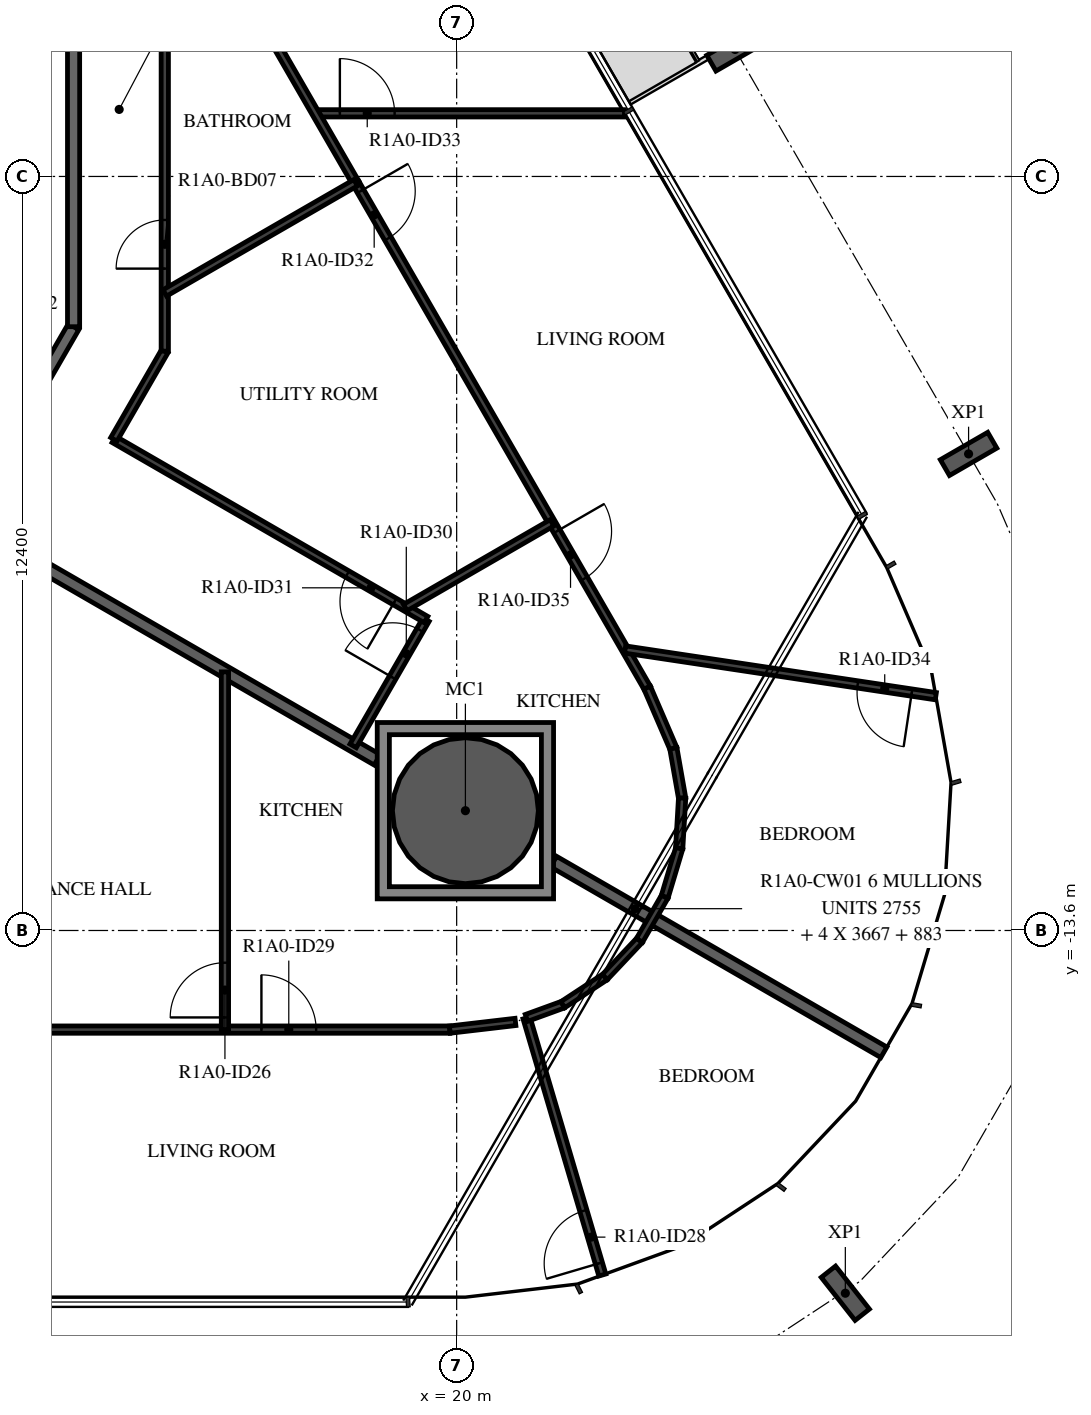
"""IFC4 building model, lengths in metres.
Left out: names, types, materials, properties, quantities, classifications, styles, units other than length and angle.
Written with IfcOpenShell. Run it as: python <this file> out.ifc"""

import sys

from ifc_helpers import new_model, si_unit, direction, frame, frame_2d, origin, origin_2d, place, context, subcontext, project, spatial, polyline, rectangle, hollow_circle, i_section, outline, extrude, element, fill, save


model = new_model("IFC4")
c1 = context("Model", 3, precision=1e-05, world=origin(), true_north=direction((0.0, 1.0)))
c2 = subcontext(c1, "Body", "Model", "MODEL_VIEW")
j1 = project(units=[si_unit("LENGTHUNIT", "METRE"), si_unit("PLANEANGLEUNIT", "RADIAN")], contexts=[c1])
p1 = place(None, origin())
s1 = spatial("IfcSite", under=j1, at=p1, CompositionType="ELEMENT")
p2 = place(p1, origin())
s2 = spatial("IfcBuilding", under=s1, at=p2, CompositionType="ELEMENT")
p3 = place(p2, frame((0.0, 0.0, 45.4)))
s3 = spatial("IfcBuildingStorey", under=s2, at=p3, CompositionType="ELEMENT", Elevation=45.4)
p4 = place(p3, frame((20.144, -11.63, -0.38), z_axis=(0.0, 0.0, 1.0), x_axis=(1.0, 0.0, 0.0)))
e1 = element("IfcColumn", 1, at=p4, inside=s3, PredefinedType="COLUMN", context=c2, shape_type="SweptSolid", body=[
    extrude(hollow_circle(Radius=1.2, WallThickness=0.06, at=origin_2d()), origin(), (0.0, 0.0, 1.0), 3.5),
])
for number, where, z_axis, x_axis in (
    (2, (26.392, -19.565, -0.38), (0.0, 0.0, 1.0), (-0.786, -0.619, 0.0)),
    (3, (28.419, -5.763, -0.38), (0.0, 0.0, 1.0), (0.5, -0.866, 0.0)),
    (4, (24.579, 0.888, -0.38), (0.0, 0.0, 1.0), (0.5, -0.866, 0.0)),
):
    element("IfcColumn", number, at=place(p3, frame(where, z_axis=z_axis, x_axis=x_axis)), inside=s3, PredefinedType="COLUMN", context=c2, shape_type="SweptSolid", body=[
        extrude(i_section(OverallWidth=0.3, OverallDepth=0.9, WebThickness=0.019, FlangeThickness=0.035, FilletRadius=0.03, at=origin_2d()), origin(), (0.0, 0.0, 1.0), 3.5),
    ])
p5 = place(p3, frame((11.865, -6.849, 0.0), z_axis=(0.0, 0.0, 1.0), x_axis=(0.500002704028, 0.866023842607, 0.0)))
e5 = element("IfcWall", 5, at=p5, inside=s3, PredefinedType="STANDARD", context=c2, shape_type="SweptSolid", body=[
    extrude(rectangle(XDim=3.67, YDim=0.2, at=frame_2d((1.835, 0.0))), origin(), (0.0, 0.0, 1.0), 3.12),
])
p6 = place(p3, frame((13.7, -3.671, 0.0), z_axis=(0.0, 0.0, 1.0), x_axis=(0.0, 1.0, 0.0)))
e6 = element("IfcWall", 6, at=p6, inside=s3, PredefinedType="STANDARD", context=c2, shape_type="SweptSolid", body=[
    extrude(rectangle(XDim=7.146, YDim=0.2, at=frame_2d((3.573, 0.0))), origin(), (0.0, 0.0, 1.0), 3.12),
])
p7 = place(p6, frame((5.947, 0.0, 0.0)))
e7 = element("IfcOpeningElement", 7, at=p7, cuts=e6, PredefinedType="OPENING", context=c2, shape_type="SweptSolid", body=[
    extrude(rectangle(XDim=1.0, YDim=2.1, at=frame_2d((0.5, 1.05))), frame((0.0, 0.11, 0.0), z_axis=(0.0, -1.0, 0.0), x_axis=(1.0, 0.0, 0.0)), (0.0, 0.0, 1.0), 0.22),
])
p8 = place(p3, frame((18.694, -10.793, 0.0), z_axis=(0.0, 0.0, 1.0), x_axis=(-0.865964895271, 0.500104789178, 0.0)))
e8 = element("IfcWall", 8, at=p8, inside=s3, PredefinedType="STANDARD", context=c2, shape_type="SweptSolid", body=[
    extrude(rectangle(XDim=7.885, YDim=0.2, at=frame_2d((3.943, 0.0))), origin(), (0.0, 0.0, 1.0), 3.12),
])
p9 = place(p3, frame((27.025, -15.603, 0.0), z_axis=(0.0, 0.0, 1.0), x_axis=(-0.866030653443, 0.499990907215, 0.0)))
e9 = element("IfcWall", 9, at=p9, inside=s3, PredefinedType="STANDARD", context=c2, shape_type="SweptSolid", body=[
    extrude(rectangle(XDim=6.271, YDim=0.2, at=frame_2d((3.136, 0.0))), origin(), (0.0, 0.0, 1.0), 3.12),
])
p10 = place(p3, frame((9.124, -15.23, 0.0), z_axis=(0.0, 0.0, 1.0), x_axis=(1.0, 0.0, 0.0)))
e10 = element("IfcWall", 10, at=p10, inside=s3, PredefinedType="PARTITIONING", context=c2, shape_type="SweptSolid", body=[
    extrude(rectangle(XDim=10.764, YDim=0.12, at=frame_2d((5.382, 0.0))), origin(), (0.0, 0.0, 1.0), 3.12),
])
p11 = place(p10, frame((0.3, 0.0, 0.0)))
e11 = element("IfcOpeningElement", 11, at=p11, cuts=e10, PredefinedType="OPENING", context=c2, shape_type="SweptSolid", body=[
    extrude(rectangle(XDim=0.9, YDim=2.1, at=frame_2d((0.45, 1.05))), frame((0.0, 0.07, 0.0), z_axis=(0.0, -1.0, 0.0), x_axis=(1.0, 0.0, 0.0)), (0.0, 0.0, 1.0), 0.14),
])
p12 = place(p10, frame((7.665, 0.0, 0.0)))
e12 = element("IfcOpeningElement", 12, at=p12, cuts=e10, PredefinedType="OPENING", context=c2, shape_type="SweptSolid", body=[
    extrude(rectangle(XDim=0.9, YDim=2.1, at=frame_2d((0.45, 1.05))), frame((0.0, 0.07, 0.0), z_axis=(0.0, -1.0, 0.0), x_axis=(1.0, 0.0, 0.0)), (0.0, 0.0, 1.0), 0.14),
])
p13 = place(p3, frame((16.189, -15.23, 0.0), z_axis=(0.0, 0.0, 1.0), x_axis=(0.0, 1.0, 0.0)))
e13 = element("IfcWall", 13, at=p13, inside=s3, PredefinedType="PARTITIONING", context=c2, shape_type="SweptSolid", body=[
    extrude(rectangle(XDim=5.883, YDim=0.12, at=frame_2d((2.942, 0.0))), origin(), (0.0, 0.0, 1.0), 3.12),
])
p14 = place(p13, frame((0.2, 0.0, 0.0)))
e14 = element("IfcOpeningElement", 14, at=p14, cuts=e13, PredefinedType="OPENING", context=c2, shape_type="SweptSolid", body=[
    extrude(rectangle(XDim=0.9, YDim=2.1, at=frame_2d((0.45, 1.05))), frame((0.0, 0.07, 0.0), z_axis=(0.0, -1.0, 0.0), x_axis=(1.0, 0.0, 0.0)), (0.0, 0.0, 1.0), 0.14),
])
p15 = place(p3, frame((20.967, -15.104, 0.0), z_axis=(0.0, 0.0, 1.0), x_axis=(-0.993231641151, -0.116150363826, 0.0)))
e15 = element("IfcWall", 15, at=p15, inside=s3, PredefinedType="PARTITIONING", context=c2, shape_type="SweptSolid", body=[
    extrude(rectangle(XDim=1.087, YDim=0.12, at=frame_2d((0.543, 0.0))), origin(), (0.0, 0.0, 1.0), 3.12),
])
p16 = place(p3, frame((22.396, -19.266, 0.0), z_axis=(0.0, 0.0, 1.0), x_axis=(-0.282873823334, 0.959157130022, 0.0)))
e16 = element("IfcWall", 16, at=p16, inside=s3, PredefinedType="PARTITIONING", context=c2, shape_type="SweptSolid", body=[
    extrude(rectangle(XDim=4.409, YDim=0.12, at=frame_2d((2.204, 0.0))), origin(), (0.0, 0.0, 1.0), 3.12),
])
p17 = place(p16, frame((0.2, 0.0, 0.0)))
e17 = element("IfcOpeningElement", 17, at=p17, cuts=e16, PredefinedType="OPENING", context=c2, shape_type="SweptSolid", body=[
    extrude(rectangle(XDim=0.9, YDim=2.1, at=frame_2d((0.45, 1.05))), frame((0.0, 0.07, 0.0), z_axis=(0.0, -1.0, 0.0), x_axis=(1.0, 0.0, 0.0)), (0.0, 0.0, 1.0), 0.14),
])
p18 = place(p3, frame((21.149, -15.038, 0.0), z_axis=(0.0, 0.0, 1.0), x_axis=(0.939726102094, 0.341928140173, 0.0)))
e18 = element("IfcWall", 18, at=p18, inside=s3, PredefinedType="PARTITIONING", context=c2, shape_type="SweptSolid", body=[
    extrude(rectangle(XDim=0.635, YDim=0.12, at=frame_2d((0.318, 0.0))), origin(), (0.0, 0.0, 1.0), 3.12),
])
p19 = place(p3, frame((21.746, -14.82, 0.0), z_axis=(0.0, 0.0, 1.0), x_axis=(0.835477570013, 0.549524549046, 0.0)))
e19 = element("IfcWall", 19, at=p19, inside=s3, PredefinedType="PARTITIONING", context=c2, shape_type="SweptSolid", body=[
    extrude(rectangle(XDim=0.829, YDim=0.12, at=frame_2d((0.415, 0.0))), origin(), (0.0, 0.0, 1.0), 3.12),
])
p20 = place(p3, frame((22.438, -14.365, 0.0), z_axis=(0.0, 0.0, 1.0), x_axis=(0.686182189596, 0.727429723535, 0.0)))
e20 = element("IfcWall", 20, at=p20, inside=s3, PredefinedType="PARTITIONING", context=c2, shape_type="SweptSolid", body=[
    extrude(rectangle(XDim=0.829, YDim=0.12, at=frame_2d((0.414, 0.0))), origin(), (0.0, 0.0, 1.0), 3.12),
])
p21 = place(p3, frame((23.007, -13.762, 0.0), z_axis=(0.0, 0.0, 1.0), x_axis=(0.500002839747, 0.86602376425, 0.0)))
e21 = element("IfcWall", 21, at=p21, inside=s3, PredefinedType="PARTITIONING", context=c2, shape_type="SweptSolid", body=[
    extrude(rectangle(XDim=0.829, YDim=0.12, at=frame_2d((0.415, 0.0))), origin(), (0.0, 0.0, 1.0), 3.12),
])
p22 = place(p3, frame((18.298, -10.564, 0.0), z_axis=(0.0, 0.0, 1.0), x_axis=(0.499960392047, 0.866048270239, 0.0)))
e22 = element("IfcWall", 22, at=p22, inside=s3, PredefinedType="PARTITIONING", context=c2, shape_type="SweptSolid", body=[
    extrude(rectangle(XDim=2.398, YDim=0.12, at=frame_2d((1.199, 0.0))), origin(), (0.0, 0.0, 1.0), 3.12),
])
p23 = place(p22, frame((1.298, 0.0, 0.0)))
e23 = element("IfcOpeningElement", 23, at=p23, cuts=e22, PredefinedType="OPENING", context=c2, shape_type="SweptSolid", body=[
    extrude(rectangle(XDim=0.9, YDim=2.1, at=frame_2d((0.45, 1.05))), frame((0.0, 0.07, 0.0), z_axis=(0.0, -1.0, 0.0), x_axis=(1.0, 0.0, 0.0)), (0.0, 0.0, 1.0), 0.14),
])
p24 = place(p3, frame((19.497, -8.487, 0.0), z_axis=(0.0, 0.0, 1.0), x_axis=(-0.866027165828, 0.499996948039, 0.0)))
e24 = element("IfcWall", 24, at=p24, inside=s3, PredefinedType="PARTITIONING", context=c2, shape_type="SweptSolid", body=[
    extrude(rectangle(XDim=5.928, YDim=0.12, at=frame_2d((2.964, 0.0))), origin(), (0.0, 0.0, 1.0), 3.12),
])
p25 = place(p24, frame((0.595, 0.0, 0.0)))
e25 = element("IfcOpeningElement", 25, at=p25, cuts=e24, PredefinedType="OPENING", context=c2, shape_type="SweptSolid", body=[
    extrude(rectangle(XDim=0.9, YDim=2.1, at=frame_2d((0.45, 1.05))), frame((0.0, 0.07, 0.0), z_axis=(0.0, -1.0, 0.0), x_axis=(1.0, 0.0, 0.0)), (0.0, 0.0, 1.0), 0.14),
])
p26 = place(p3, frame((14.363, -5.523, 0.0), z_axis=(0.0, 0.0, 1.0), x_axis=(0.499995851058, 0.866027799164, 0.0)))
e26 = element("IfcWall", 26, at=p26, inside=s3, PredefinedType="PARTITIONING", context=c2, shape_type="SweptSolid", body=[
    extrude(rectangle(XDim=1.675, YDim=0.12, at=frame_2d((0.837, 0.0))), origin(), (0.0, 0.0, 1.0), 3.12),
])
p27 = place(p3, frame((15.2, -4.073, 0.0), z_axis=(0.0, 0.0, 1.0), x_axis=(0.0, 1.0, 0.0)))
e27 = element("IfcWall", 27, at=p27, inside=s3, PredefinedType="PARTITIONING", context=c2, shape_type="SweptSolid", body=[
    extrude(rectangle(XDim=8.146, YDim=0.12, at=frame_2d((4.073, 0.0))), origin(), (0.0, 0.0, 1.0), 3.12),
])
p28 = place(p27, frame((1.357, 0.0, 0.0)))
e28 = element("IfcOpeningElement", 28, at=p28, cuts=e27, PredefinedType="OPENING", context=c2, shape_type="SweptSolid", body=[
    extrude(rectangle(XDim=0.8, YDim=2.1, at=frame_2d((0.4, 1.05))), frame((0.0, 0.07, 0.0), z_axis=(0.0, -1.0, 0.0), x_axis=(1.0, 0.0, 0.0)), (0.0, 0.0, 1.0), 0.14),
])
p29 = place(p3, frame((17.679, -0.162, 0.0), z_axis=(0.0, 0.0, 1.0), x_axis=(1.0, 0.0, 0.0)))
e29 = element("IfcWall", 29, at=p29, inside=s3, PredefinedType="PARTITIONING", context=c2, shape_type="SweptSolid", body=[
    extrude(rectangle(XDim=5.081, YDim=0.12, at=frame_2d((2.54, 0.0))), origin(), (0.0, 0.0, 1.0), 3.12),
])
p30 = place(p29, frame((0.4, 0.0, 0.0)))
e30 = element("IfcOpeningElement", 30, at=p30, cuts=e29, PredefinedType="OPENING", context=c2, shape_type="SweptSolid", body=[
    extrude(rectangle(XDim=0.9, YDim=2.1, at=frame_2d((0.45, 1.05))), frame((0.0, 0.07, 0.0), z_axis=(0.0, -1.0, 0.0), x_axis=(1.0, 0.0, 0.0)), (0.0, 0.0, 1.0), 0.14),
])
p31 = place(p3, frame((15.11, 4.289, 0.0), z_axis=(0.0, 0.0, 1.0), x_axis=(0.500001702147, -0.866024421047, 0.0)))
e31 = element("IfcWall", 31, at=p31, inside=s3, PredefinedType="PARTITIONING", context=c2, shape_type="SweptSolid", body=[
    extrude(rectangle(XDim=6.458, YDim=0.12, at=frame_2d((3.229, 0.0))), origin(), (0.0, 0.0, 1.0), 3.12),
])
p32 = place(p3, frame((18.339, -1.303, 0.0), z_axis=(0.0, 0.0, 1.0), x_axis=(0.499989127021, -0.866031681211, 0.0)))
e32 = element("IfcWall", 32, at=p32, inside=s3, PredefinedType="PARTITIONING", context=c2, shape_type="SweptSolid", body=[
    extrude(rectangle(XDim=9.589, YDim=0.12, at=frame_2d((4.794, 0.0))), origin(), (0.0, 0.0, 1.0), 3.12),
])
p33 = place(p32, frame((0.16, 0.0, 0.0)))
e33 = element("IfcOpeningElement", 33, at=p33, cuts=e32, PredefinedType="OPENING", context=c2, shape_type="SweptSolid", body=[
    extrude(rectangle(XDim=0.9, YDim=2.1, at=frame_2d((0.45, 1.05))), frame((0.0, 0.07, 0.0), z_axis=(0.0, -1.0, 0.0), x_axis=(1.0, 0.0, 0.0)), (0.0, 0.0, 1.0), 0.14),
])
p34 = place(p32, frame((6.618, 0.0, 0.0)))
e34 = element("IfcOpeningElement", 34, at=p34, cuts=e32, PredefinedType="OPENING", context=c2, shape_type="SweptSolid", body=[
    extrude(rectangle(XDim=0.9, YDim=2.1, at=frame_2d((0.45, 1.05))), frame((0.0, 0.07, 0.0), z_axis=(0.0, -1.0, 0.0), x_axis=(1.0, 0.0, 0.0)), (0.0, 0.0, 1.0), 0.14),
])
p35 = place(p3, frame((23.133, -9.608, 0.0), z_axis=(0.0, 0.0, 1.0), x_axis=(0.396195073027, -0.918166359713, 0.0)))
e35 = element("IfcWall", 35, at=p35, inside=s3, PredefinedType="PARTITIONING", context=c2, shape_type="SweptSolid", body=[
    extrude(rectangle(XDim=1.087, YDim=0.12, at=frame_2d((0.543, 0.0))), origin(), (0.0, 0.0, 1.0), 3.12),
])
for number, where, z_axis, x_axis in (
    (36, (23.564, -10.606, 0.0), (0.0, 0.0, 1.0), (0.173, -0.985, 0.0)),
    (37, (23.708, -11.422, 0.0), (0.0, 0.0, 1.0), (-0.058, -0.998, 0.0)),
):
    element("IfcWall", number, at=place(p3, frame(where, z_axis=z_axis, x_axis=x_axis)), inside=s3, PredefinedType="PARTITIONING", context=c2, shape_type="SweptSolid", body=[
        extrude(rectangle(XDim=0.829, YDim=0.12, at=frame_2d((0.415, 0.0))), origin(), (0.0, 0.0, 1.0), 3.12),
    ])
p36 = place(p3, frame((23.659, -12.25, 0.0), z_axis=(0.0, 0.0, 1.0), x_axis=(-0.286834510868, -0.957980147694, 0.0)))
e38 = element("IfcWall", 38, at=p36, inside=s3, PredefinedType="PARTITIONING", context=c2, shape_type="SweptSolid", body=[
    extrude(rectangle(XDim=0.829, YDim=0.12, at=frame_2d((0.415, 0.0))), origin(), (0.0, 0.0, 1.0), 3.12),
])
p37 = place(p3, frame((27.88, -9.747, 0.0), z_axis=(0.0, 0.0, 1.0), x_axis=(-0.988899241625, 0.14858765061, 0.0)))
e39 = element("IfcWall", 39, at=p37, inside=s3, PredefinedType="PARTITIONING", context=c2, shape_type="SweptSolid", body=[
    extrude(rectangle(XDim=5.167, YDim=0.12, at=frame_2d((2.584, 0.0))), origin(), (0.0, 0.0, 1.0), 3.12),
])
p38 = place(p37, frame((0.4, 0.0, 0.0)))
e40 = element("IfcOpeningElement", 40, at=p38, cuts=e39, PredefinedType="OPENING", context=c2, shape_type="SweptSolid", body=[
    extrude(rectangle(XDim=0.9, YDim=2.1, at=frame_2d((0.45, 1.05))), frame((0.0, 0.07, 0.0), z_axis=(0.0, -1.0, 0.0), x_axis=(1.0, 0.0, 0.0)), (0.0, 0.0, 1.0), 0.14),
])
p39 = place(p3, frame((21.568, -6.896, 0.0), z_axis=(0.0, 0.0, 1.0), x_axis=(-0.866029478545, -0.499992942241, 0.0)))
e41 = element("IfcWall", 41, at=p39, inside=s3, PredefinedType="PARTITIONING", context=c2, shape_type="SweptSolid", body=[
    extrude(rectangle(XDim=2.787, YDim=0.12, at=frame_2d((1.393, 0.0))), origin(), (0.0, 0.0, 1.0), 3.12),
])
p40 = place(p3, frame((18.339, -1.303, 0.0), z_axis=(0.0, 0.0, 1.0), x_axis=(-0.866037510713, -0.499979029598, 0.0)))
e42 = element("IfcWall", 42, at=p40, inside=s3, PredefinedType="PARTITIONING", context=c2, shape_type="SweptSolid", body=[
    extrude(rectangle(XDim=3.624, YDim=0.12, at=frame_2d((1.812, 0.0))), origin(), (0.0, 0.0, 1.0), 3.12),
])
p41 = place(p3, origin())
e43 = element("IfcWall", 43, at=p41, inside=s3, PredefinedType="STANDARD", context=c2, shape_type="SweptSolid", body=[
    extrude(outline(polyline([(21.594, -10.18), (21.594, -13.08), (18.694, -13.08), (18.694, -10.18), (21.594, -10.18)]), holes=[polyline([(18.894, -12.88), (21.394, -12.88), (21.394, -10.38), (18.894, -10.38), (18.894, -12.88)])]), origin(), (0.0, 0.0, 1.0), 3.12),
])
p42 = place(p14, origin())
e44 = element("IfcDoor", 44, at=p42, inside=s3, OperationType="SINGLE_SWING_RIGHT", PredefinedType="DOOR", context=c2, shape_type="SweptSolid", body=[
    extrude(rectangle(XDim=0.9, YDim=2.1, at=frame_2d((0.45, 1.05))), frame((0.0, 0.025, 0.0), z_axis=(0.0, -1.0, 0.0), x_axis=(1.0, 0.0, 0.0)), (0.0, 0.0, 1.0), 0.05),
])
fill(e14, e44)
p43 = place(p17, origin())
e45 = element("IfcDoor", 45, at=p43, inside=s3, OperationType="SINGLE_SWING_RIGHT", PredefinedType="DOOR", context=c2, shape_type="SweptSolid", body=[
    extrude(rectangle(XDim=0.9, YDim=2.1, at=frame_2d((0.45, 1.05))), frame((0.0, 0.025, 0.0), z_axis=(0.0, -1.0, 0.0), x_axis=(1.0, 0.0, 0.0)), (0.0, 0.0, 1.0), 0.05),
])
fill(e17, e45)
p44 = place(p12, origin())
e46 = element("IfcDoor", 46, at=p44, inside=s3, OperationType="SINGLE_SWING_LEFT", PredefinedType="DOOR", context=c2, shape_type="SweptSolid", body=[
    extrude(rectangle(XDim=0.9, YDim=2.1, at=frame_2d((0.45, 1.05))), frame((0.0, 0.025, 0.0), z_axis=(0.0, -1.0, 0.0), x_axis=(1.0, 0.0, 0.0)), (0.0, 0.0, 1.0), 0.05),
])
fill(e12, e46)
p45 = place(p23, origin())
e47 = element("IfcDoor", 47, at=p45, inside=s3, OperationType="SINGLE_SWING_LEFT", PredefinedType="DOOR", context=c2, shape_type="SweptSolid", body=[
    extrude(rectangle(XDim=0.9, YDim=2.1, at=frame_2d((0.45, 1.05))), frame((0.0, 0.025, 0.0), z_axis=(0.0, -1.0, 0.0), x_axis=(1.0, 0.0, 0.0)), (0.0, 0.0, 1.0), 0.05),
])
fill(e23, e47)
p46 = place(p25, origin())
e48 = element("IfcDoor", 48, at=p46, inside=s3, OperationType="SINGLE_SWING_LEFT", PredefinedType="DOOR", context=c2, shape_type="SweptSolid", body=[
    extrude(rectangle(XDim=0.9, YDim=2.1, at=frame_2d((0.45, 1.05))), frame((0.0, 0.025, 0.0), z_axis=(0.0, -1.0, 0.0), x_axis=(1.0, 0.0, 0.0)), (0.0, 0.0, 1.0), 0.05),
])
fill(e25, e48)
p47 = place(p28, origin())
e49 = element("IfcDoor", 49, at=p47, inside=s3, OperationType="SINGLE_SWING_LEFT", PredefinedType="DOOR", context=c2, shape_type="SweptSolid", body=[
    extrude(rectangle(XDim=0.8, YDim=2.1, at=frame_2d((0.4, 1.05))), frame((0.0, 0.025, 0.0), z_axis=(0.0, -1.0, 0.0), x_axis=(1.0, 0.0, 0.0)), (0.0, 0.0, 1.0), 0.05),
])
fill(e28, e49)
p48 = place(p33, origin())
e50 = element("IfcDoor", 50, at=p48, inside=s3, OperationType="SINGLE_SWING_LEFT", PredefinedType="DOOR", context=c2, shape_type="SweptSolid", body=[
    extrude(rectangle(XDim=0.9, YDim=2.1, at=frame_2d((0.45, 1.05))), frame((0.0, 0.025, 0.0), z_axis=(0.0, -1.0, 0.0), x_axis=(1.0, 0.0, 0.0)), (0.0, 0.0, 1.0), 0.05),
])
fill(e33, e50)
p49 = place(p30, origin())
e51 = element("IfcDoor", 51, at=p49, inside=s3, OperationType="SINGLE_SWING_LEFT", PredefinedType="DOOR", context=c2, shape_type="SweptSolid", body=[
    extrude(rectangle(XDim=0.9, YDim=2.1, at=frame_2d((0.45, 1.05))), frame((0.0, 0.025, 0.0), z_axis=(0.0, -1.0, 0.0), x_axis=(1.0, 0.0, 0.0)), (0.0, 0.0, 1.0), 0.05),
])
fill(e30, e51)
p50 = place(p38, origin())
e52 = element("IfcDoor", 52, at=p50, inside=s3, OperationType="SINGLE_SWING_LEFT", PredefinedType="DOOR", context=c2, shape_type="SweptSolid", body=[
    extrude(rectangle(XDim=0.9, YDim=2.1, at=frame_2d((0.45, 1.05))), frame((0.0, 0.025, 0.0), z_axis=(0.0, -1.0, 0.0), x_axis=(1.0, 0.0, 0.0)), (0.0, 0.0, 1.0), 0.05),
])
fill(e40, e52)
p51 = place(p34, origin())
e53 = element("IfcDoor", 53, at=p51, inside=s3, OperationType="SINGLE_SWING_RIGHT", PredefinedType="DOOR", context=c2, shape_type="SweptSolid", body=[
    extrude(rectangle(XDim=0.9, YDim=2.1, at=frame_2d((0.45, 1.05))), frame((0.0, 0.025, 0.0), z_axis=(0.0, -1.0, 0.0), x_axis=(1.0, 0.0, 0.0)), (0.0, 0.0, 1.0), 0.05),
])
fill(e34, e53)
save(model, sys.argv[1])
